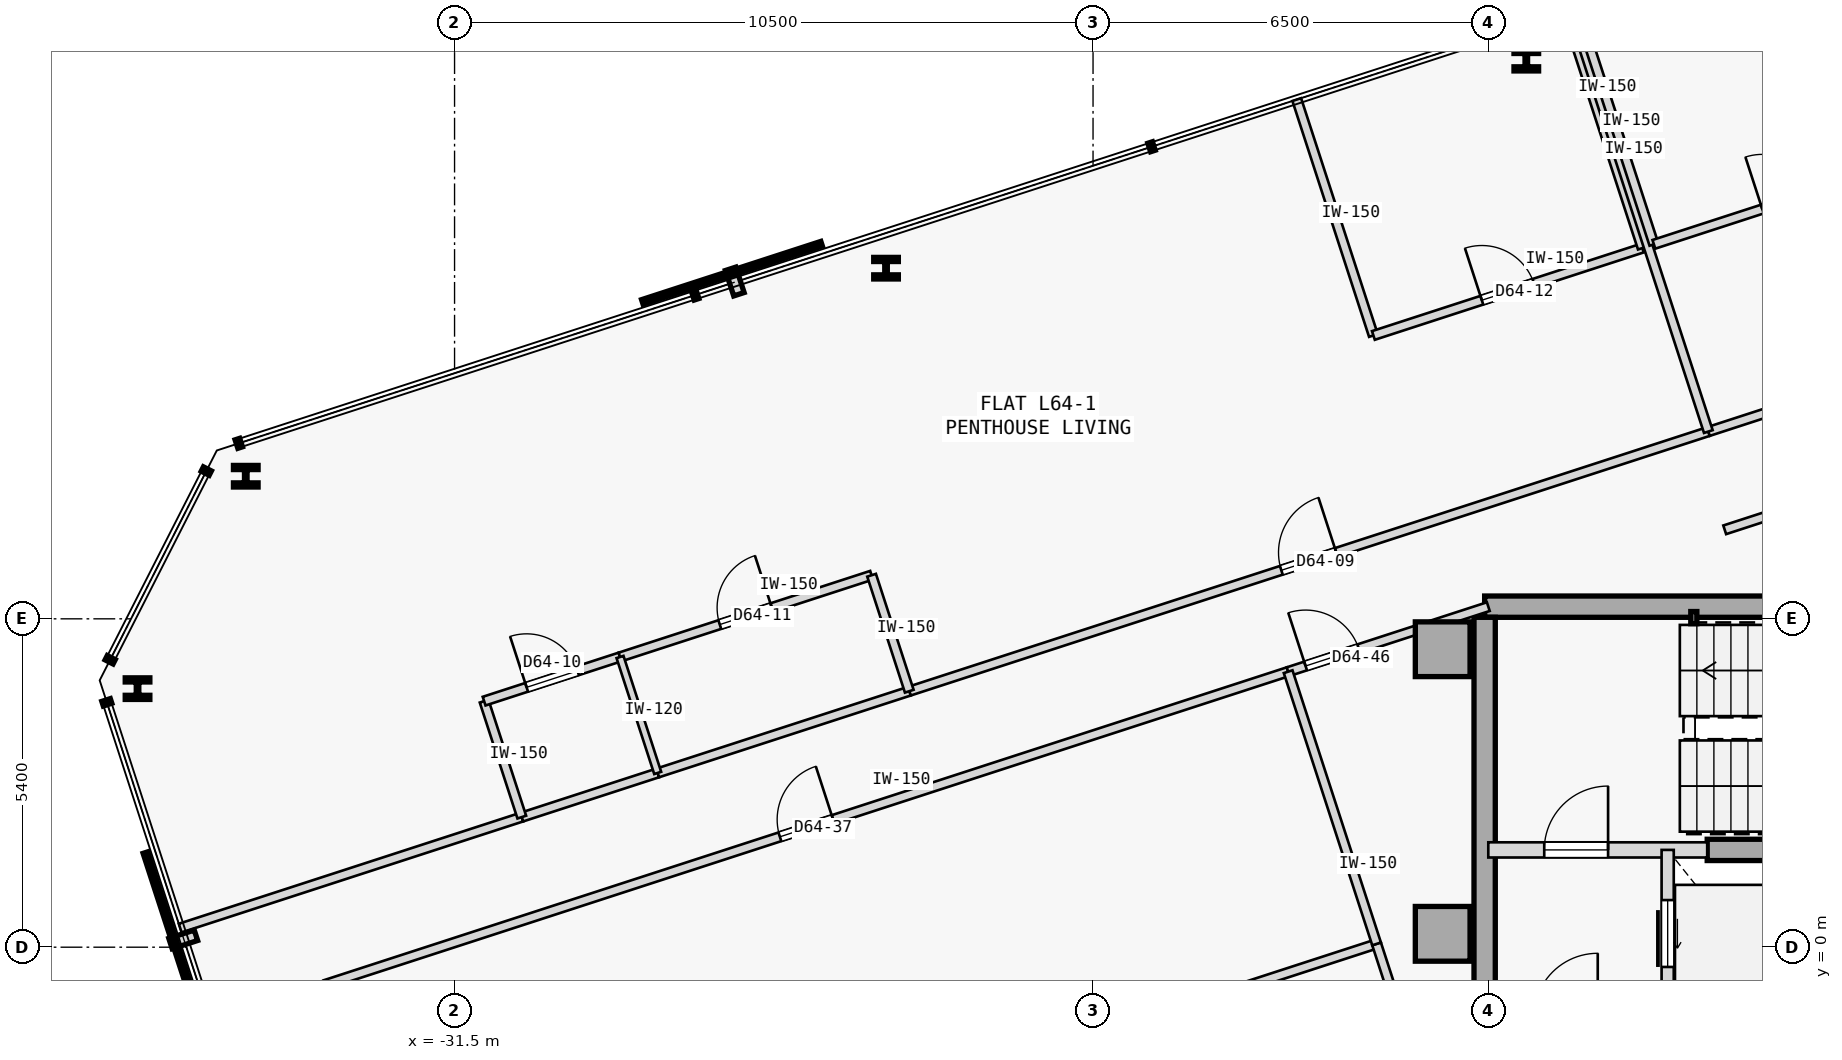
"""IFC4 building model, lengths in metres.
Left out: names, types, materials, properties, quantities, classifications, styles, units other than length and angle.
Written with IfcOpenShell. Run it as: python <this file> out.ifc"""

import sys

from ifc_helpers import new_model, si_unit, direction, frame, frame_2d, origin, origin_2d, place, context, subcontext, project, spatial, rectangle, hollow_rectangle, i_section, extrude, element, fill, save


model = new_model("IFC4")
c1 = context("Model", 3, precision=1e-05, world=origin(), true_north=direction((0.0, 1.0)))
c2 = subcontext(c1, "Body", "Model", "MODEL_VIEW")
j1 = project(units=[si_unit("LENGTHUNIT", "METRE"), si_unit("PLANEANGLEUNIT", "RADIAN")], contexts=[c1])
p1 = place(None, origin())
s1 = spatial("IfcSite", under=j1, at=p1, CompositionType="ELEMENT")
p2 = place(p1, origin())
s2 = spatial("IfcBuilding", under=s1, at=p2, CompositionType="ELEMENT")
p3 = place(p2, frame((0.0, 0.0, 241.05)))
s3 = spatial("IfcBuildingStorey", under=s2, at=p3, CompositionType="ELEMENT", Elevation=241.05)
for number, where, z_axis, x_axis in (
    (1, (-15.25, 4.9, 0.0), (0.0, 0.0, 1.0), (1.0, 0.0, 0.0)),
    (2, (-15.25, 0.22, 0.0), (0.0, 0.0, 1.0), (1.0, 0.0, 0.0)),
):
    element("IfcColumn", number, at=place(p3, frame(where, z_axis=z_axis, x_axis=x_axis)), inside=s3, PredefinedType="COLUMN", context=c2, shape_type="SweptSolid", body=[
        extrude(rectangle(XDim=0.9, YDim=0.9, at=origin_2d()), origin(), (0.0, 0.0, 1.0), 3.35),
    ])
p4 = place(p3, frame((-14.56, 5.6, 0.0), z_axis=(0.0, 0.0, 1.0), x_axis=(1.0, 0.0, 0.0)))
e3 = element("IfcWall", 3, at=p4, inside=s3, PredefinedType="SHEAR", context=c2, shape_type="SweptSolid", body=[
    extrude(rectangle(XDim=11.41, YDim=0.35, at=frame_2d((5.705, 0.0))), origin(), (0.0, 0.0, 1.0), 3.125),
])
p5 = place(p3, frame((-14.56, -5.425, 0.0), z_axis=(0.0, 0.0, 1.0), x_axis=(0.0, 1.0, 0.0)))
e4 = element("IfcWall", 4, at=p5, inside=s3, PredefinedType="SHEAR", context=c2, shape_type="SweptSolid", body=[
    extrude(rectangle(XDim=10.85, YDim=0.35, at=frame_2d((5.425, 0.0))), origin(), (0.0, 0.0, 1.0), 3.125),
])
p6 = place(p3, frame((-10.9, 1.6, 0.0), z_axis=(0.0, 0.0, 1.0), x_axis=(1.0, 0.0, 0.0)))
e5 = element("IfcWall", 5, at=p6, inside=s3, PredefinedType="SHEAR", context=c2, shape_type="SweptSolid", body=[
    extrude(rectangle(XDim=5.15, YDim=0.35, at=frame_2d((2.575, 0.0))), origin(), (0.0, 0.0, 1.0), 3.125),
])
p7 = place(p3, frame((-11.12, 5.42, 0.0), z_axis=(0.0, 0.0, 1.0), x_axis=(1.0, 0.0, 0.0)))
e6 = element("IfcColumn", 6, at=p7, inside=s3, PredefinedType="COLUMN", context=c2, shape_type="SweptSolid", body=[
    extrude(hollow_rectangle(XDim=0.1, YDim=0.2, WallThickness=0.008, at=origin_2d()), origin(), (0.0, 0.0, 1.0), 3.35),
])
for number, where, z_axis, x_axis in (
    (7, (-13.875, 14.587, 0.0), (0.0, 0.0, 1.0), (1.0, 0.0, 0.0)),
    (8, (-24.404, 11.166, 0.0), (0.0, 0.0, 1.0), (1.0, 0.0, 0.0)),
    (9, (-34.934, 7.745, 0.0), (0.0, 0.0, 1.0), (1.0, 0.0, 0.0)),
    (10, (-36.713, 4.252, 0.0), (0.0, 0.0, 1.0), (1.0, 0.0, 0.0)),
):
    element("IfcColumn", number, at=place(p3, frame(where, z_axis=z_axis, x_axis=x_axis)), inside=s3, PredefinedType="COLUMN", context=c2, shape_type="SweptSolid", body=[
        extrude(i_section(OverallWidth=0.405, OverallDepth=0.355, WebThickness=0.042, FlangeThickness=0.068, FilletRadius=0.015, at=origin_2d()), origin(), (0.0, 0.0, 1.0), 3.35),
    ])
p8 = place(p3, frame((-14.5, 1.6, 0.0), z_axis=(0.0, 0.0, 1.0), x_axis=(1.0, 0.0, 0.0)))
e11 = element("IfcWall", 11, at=p8, inside=s3, PredefinedType="STANDARD", context=c2, shape_type="SweptSolid", body=[
    extrude(rectangle(XDim=3.6, YDim=0.25, at=frame_2d((1.8, 0.0))), origin(), (0.0, 0.0, 1.0), 3.125),
])
p9 = place(p8, frame((0.92, 0.0, 0.0)))
e12 = element("IfcOpeningElement", 12, at=p9, cuts=e11, PredefinedType="OPENING", context=c2, shape_type="SweptSolid", body=[
    extrude(rectangle(XDim=1.05, YDim=2.15, at=frame_2d((0.525, 1.075))), frame((0.0, 0.135, 0.0), z_axis=(0.0, -1.0, 0.0), x_axis=(1.0, 0.0, 0.0)), (0.0, 0.0, 1.0), 0.27),
])
p10 = place(p3, frame((-11.55, -1.15, 0.0), z_axis=(0.0, 0.0, 1.0), x_axis=(0.0, 1.0, 0.0)))
e13 = element("IfcWall", 13, at=p10, inside=s3, PredefinedType="STANDARD", context=c2, shape_type="SweptSolid", body=[
    extrude(rectangle(XDim=2.75, YDim=0.2, at=frame_2d((1.375, 0.0))), origin(), (0.0, 0.0, 1.0), 3.125),
])
p11 = place(p10, frame((0.825, 0.0, 0.0)))
e14 = element("IfcOpeningElement", 14, at=p11, cuts=e13, PredefinedType="OPENING", context=c2, shape_type="SweptSolid", body=[
    extrude(rectangle(XDim=1.1, YDim=2.15, at=frame_2d((0.55, 1.075))), frame((0.0, 0.11, 0.0), z_axis=(0.0, -1.0, 0.0), x_axis=(1.0, 0.0, 0.0)), (0.0, 0.0, 1.0), 0.22),
])
p12 = place(p3, frame((-36.012, 0.314, 0.0), z_axis=(0.0, 0.0, 1.0), x_axis=(0.951065348244, 0.308989811111, 0.0)))
e15 = element("IfcWall", 15, at=p12, inside=s3, PredefinedType="PARTITIONING", context=c2, shape_type="SweptSolid", body=[
    extrude(rectangle(XDim=5.907, YDim=0.15, at=frame_2d((2.954, 0.0))), origin(), (0.0, 0.0, 1.0), 3.125),
])
p13 = place(p3, frame((-24.022, 4.21, 0.0), z_axis=(0.0, 0.0, 1.0), x_axis=(0.951058997127, 0.309009359055, 0.0)))
e16 = element("IfcWall", 16, at=p13, inside=s3, PredefinedType="PARTITIONING", context=c2, shape_type="SweptSolid", body=[
    extrude(rectangle(XDim=13.817, YDim=0.15, at=frame_2d((6.908, 0.0))), origin(), (0.0, 0.0, 1.0), 3.125),
])
p14 = place(p13, frame((6.434, 0.0, 0.0)))
e17 = element("IfcOpeningElement", 17, at=p14, cuts=e16, PredefinedType="OPENING", context=c2, shape_type="SweptSolid", body=[
    extrude(rectangle(XDim=0.95, YDim=2.15, at=frame_2d((0.475, 1.075))), frame((0.0, 0.085, 0.0), z_axis=(0.0, -1.0, 0.0), x_axis=(1.0, 0.0, 0.0)), (0.0, 0.0, 1.0), 0.17),
])
p15 = place(p3, frame((-30.394, 2.139, 0.0), z_axis=(0.0, 0.0, 1.0), x_axis=(0.951045519245, 0.309050837767, 0.0)))
e18 = element("IfcWall", 18, at=p15, inside=s3, PredefinedType="PARTITIONING", context=c2, shape_type="SweptSolid", body=[
    extrude(rectangle(XDim=2.35, YDim=0.15, at=frame_2d((1.175, 0.0))), origin(), (0.0, 0.0, 1.0), 3.125),
])
p16 = place(p3, frame((-28.159, 2.866, 0.0), z_axis=(0.0, 0.0, 1.0), x_axis=(0.951052627573, 0.309028962374, 0.0)))
e19 = element("IfcWall", 19, at=p16, inside=s3, PredefinedType="PARTITIONING", context=c2, shape_type="SweptSolid", body=[
    extrude(rectangle(XDim=4.35, YDim=0.15, at=frame_2d((2.175, 0.0))), origin(), (0.0, 0.0, 1.0), 3.125),
])
p17 = place(p3, frame((-10.882, 8.479, 0.0), z_axis=(0.0, 0.0, 1.0), x_axis=(0.951051887333, 0.309031240494, 0.0)))
e20 = element("IfcWall", 20, at=p17, inside=s3, PredefinedType="PARTITIONING", context=c2, shape_type="SweptSolid", body=[
    extrude(rectangle(XDim=7.551, YDim=0.15, at=frame_2d((3.775, 0.0))), origin(), (0.0, 0.0, 1.0), 3.125),
])
p18 = place(p3, frame((-33.633, -0.616, 0.0), z_axis=(0.0, 0.0, 1.0), x_axis=(0.951058192995, 0.309011833974, 0.0)))
e21 = element("IfcWall", 21, at=p18, inside=s3, PredefinedType="PARTITIONING", context=c2, shape_type="SweptSolid", body=[
    extrude(rectangle(XDim=16.657, YDim=0.15, at=frame_2d((8.329, 0.0))), origin(), (0.0, 0.0, 1.0), 3.125),
])
p19 = place(p18, frame((7.868, 0.0, 0.0)))
e22 = element("IfcOpeningElement", 22, at=p19, cuts=e21, PredefinedType="OPENING", context=c2, shape_type="SweptSolid", body=[
    extrude(rectangle(XDim=0.92, YDim=2.15, at=frame_2d((0.46, 1.075))), frame((0.0, 0.085, 0.0), z_axis=(0.0, -1.0, 0.0), x_axis=(1.0, 0.0, 0.0)), (0.0, 0.0, 1.0), 0.17),
])
p20 = place(p3, frame((-17.792, 4.531, 0.0), z_axis=(0.0, 0.0, 1.0), x_axis=(0.951047546178, 0.309044600193, 0.0)))
e23 = element("IfcWall", 23, at=p20, inside=s3, PredefinedType="PARTITIONING", context=c2, shape_type="SweptSolid", body=[
    extrude(rectangle(XDim=3.461, YDim=0.15, at=frame_2d((1.73, 0.0))), origin(), (0.0, 0.0, 1.0), 3.125),
])
p21 = place(p20, frame((0.302, 0.0, 0.0)))
e24 = element("IfcOpeningElement", 24, at=p21, cuts=e23, PredefinedType="OPENING", context=c2, shape_type="SweptSolid", body=[
    extrude(rectangle(XDim=0.92, YDim=2.15, at=frame_2d((0.46, 1.075))), frame((0.0, 0.085, 0.0), z_axis=(0.0, -1.0, 0.0), x_axis=(1.0, 0.0, 0.0)), (0.0, 0.0, 1.0), 0.17),
])
p22 = place(p3, frame((-10.612, 6.864, 0.0), z_axis=(0.0, 0.0, 1.0), x_axis=(0.951060972078, 0.309003280548, 0.0)))
e25 = element("IfcWall", 25, at=p22, inside=s3, PredefinedType="PARTITIONING", context=c2, shape_type="SweptSolid", body=[
    extrude(rectangle(XDim=7.268, YDim=0.15, at=frame_2d((3.634, 0.0))), origin(), (0.0, 0.0, 1.0), 3.125),
])
p23 = place(p22, frame((3.174, 0.0, 0.0)))
e26 = element("IfcOpeningElement", 26, at=p23, cuts=e25, PredefinedType="OPENING", context=c2, shape_type="SweptSolid", body=[
    extrude(rectangle(XDim=0.92, YDim=2.15, at=frame_2d((0.46, 1.075))), frame((0.0, 0.085, 0.0), z_axis=(0.0, -1.0, 0.0), x_axis=(1.0, 0.0, 0.0)), (0.0, 0.0, 1.0), 0.17),
])
p24 = place(p3, frame((-30.394, 2.139, 0.0), z_axis=(0.0, 0.0, 1.0), x_axis=(-0.309022749039, 0.951054646472, 0.0)))
e27 = element("IfcWall", 27, at=p24, inside=s3, PredefinedType="PARTITIONING", context=c2, shape_type="SweptSolid", body=[
    extrude(rectangle(XDim=2.005, YDim=0.15, at=frame_2d((1.002, 0.0))), origin(), (0.0, 0.0, 1.0), 3.125),
])
p25 = place(p3, frame((-31.014, 4.046, 0.0), z_axis=(0.0, 0.0, 1.0), x_axis=(0.951076048914, 0.308956872689, 0.0)))
e28 = element("IfcWall", 28, at=p25, inside=s3, PredefinedType="PARTITIONING", context=c2, shape_type="SweptSolid", body=[
    extrude(rectangle(XDim=2.35, YDim=0.15, at=frame_2d((1.175, 0.0))), origin(), (0.0, 0.0, 1.0), 3.125),
])
p26 = place(p25, frame((0.735, 0.0, 0.0)))
e29 = element("IfcOpeningElement", 29, at=p26, cuts=e28, PredefinedType="OPENING", context=c2, shape_type="SweptSolid", body=[
    extrude(rectangle(XDim=0.88, YDim=2.15, at=frame_2d((0.44, 1.075))), frame((0.0, 0.085, 0.0), z_axis=(0.0, -1.0, 0.0), x_axis=(1.0, 0.0, 0.0)), (0.0, 0.0, 1.0), 0.17),
])
p27 = place(p3, frame((-28.779, 4.772, 0.0), z_axis=(0.0, 0.0, 1.0), x_axis=(0.951052627573, 0.309028962374, 0.0)))
e30 = element("IfcWall", 30, at=p27, inside=s3, PredefinedType="PARTITIONING", context=c2, shape_type="SweptSolid", body=[
    extrude(rectangle(XDim=4.35, YDim=0.15, at=frame_2d((2.175, 0.0))), origin(), (0.0, 0.0, 1.0), 3.125),
])
p28 = place(p27, frame((1.725, 0.0, 0.0)))
e31 = element("IfcOpeningElement", 31, at=p28, cuts=e30, PredefinedType="OPENING", context=c2, shape_type="SweptSolid", body=[
    extrude(rectangle(XDim=0.9, YDim=2.15, at=frame_2d((0.45, 1.075))), frame((0.0, 0.085, 0.0), z_axis=(0.0, -1.0, 0.0), x_axis=(1.0, 0.0, 0.0)), (0.0, 0.0, 1.0), 0.17),
])
p29 = place(p3, frame((-24.022, 4.21, 0.0), z_axis=(0.0, 0.0, 1.0), x_axis=(-0.309058537449, 0.951043017129, 0.0)))
e32 = element("IfcWall", 32, at=p29, inside=s3, PredefinedType="PARTITIONING", context=c2, shape_type="SweptSolid", body=[
    extrude(rectangle(XDim=2.005, YDim=0.15, at=frame_2d((1.002, 0.0))), origin(), (0.0, 0.0, 1.0), 3.125),
])
p30 = place(p3, frame((-16.389, 10.06, 0.0), z_axis=(0.0, 0.0, 1.0), x_axis=(-0.309018403393, 0.951056058476, 0.0)))
e33 = element("IfcWall", 33, at=p30, inside=s3, PredefinedType="PARTITIONING", context=c2, shape_type="SweptSolid", body=[
    extrude(rectangle(XDim=4.079, YDim=0.15, at=frame_2d((2.04, 0.0))), origin(), (0.0, 0.0, 1.0), 3.125),
])
p31 = place(p3, frame((-16.389, 10.06, 0.0), z_axis=(0.0, 0.0, 1.0), x_axis=(0.951050272606, 0.309036209813, 0.0)))
e34 = element("IfcWall", 34, at=p31, inside=s3, PredefinedType="PARTITIONING", context=c2, shape_type="SweptSolid", body=[
    extrude(rectangle(XDim=4.65, YDim=0.15, at=frame_2d((2.325, 0.0))), origin(), (0.0, 0.0, 1.0), 3.125),
])
p32 = place(p31, frame((1.875, 0.0, 0.0)))
e35 = element("IfcOpeningElement", 35, at=p32, cuts=e34, PredefinedType="OPENING", context=c2, shape_type="SweptSolid", body=[
    extrude(rectangle(XDim=0.9, YDim=2.15, at=frame_2d((0.45, 1.075))), frame((0.0, 0.085, 0.0), z_axis=(0.0, -1.0, 0.0), x_axis=(1.0, 0.0, 0.0)), (0.0, 0.0, 1.0), 0.17),
])
p33 = place(p3, frame((-11.967, 11.497, 0.0), z_axis=(0.0, 0.0, 1.0), x_axis=(-0.309018403393, 0.951056058476, 0.0)))
e36 = element("IfcWall", 36, at=p33, inside=s3, PredefinedType="PARTITIONING", context=c2, shape_type="SweptSolid", body=[
    extrude(rectangle(XDim=4.079, YDim=0.15, at=frame_2d((2.04, 0.0))), origin(), (0.0, 0.0, 1.0), 3.125),
])
p34 = place(p3, frame((-10.882, 8.479, 0.0), z_axis=(0.0, 0.0, 1.0), x_axis=(-0.308998913866, 0.951062390819, 0.0)))
e37 = element("IfcWall", 37, at=p34, inside=s3, PredefinedType="PARTITIONING", context=c2, shape_type="SweptSolid", body=[
    extrude(rectangle(XDim=7.284, YDim=0.15, at=frame_2d((3.642, 0.0))), origin(), (0.0, 0.0, 1.0), 3.125),
])
p35 = place(p3, frame((-28.159, 2.866, 0.0), z_axis=(0.0, 0.0, 1.0), x_axis=(-0.309058537449, 0.951043017129, 0.0)))
e38 = element("IfcWall", 38, at=p35, inside=s3, PredefinedType="PARTITIONING", context=c2, shape_type="SweptSolid", body=[
    extrude(rectangle(XDim=2.005, YDim=0.12, at=frame_2d((1.002, 0.0))), origin(), (0.0, 0.0, 1.0), 3.125),
])
p36 = place(p3, frame((-11.777, 11.559, 0.0), z_axis=(0.0, 0.0, 1.0), x_axis=(-0.309018403393, 0.951056058476, 0.0)))
e39 = element("IfcWall", 39, at=p36, inside=s3, PredefinedType="PARTITIONING", context=c2, shape_type="SweptSolid", body=[
    extrude(rectangle(XDim=4.079, YDim=0.15, at=frame_2d((2.04, 0.0))), origin(), (0.0, 0.0, 1.0), 3.125),
])
p37 = place(p3, frame((-11.777, 11.559, 0.0), z_axis=(0.0, 0.0, 1.0), x_axis=(0.951050272606, 0.309036209813, 0.0)))
e40 = element("IfcWall", 40, at=p37, inside=s3, PredefinedType="PARTITIONING", context=c2, shape_type="SweptSolid", body=[
    extrude(rectangle(XDim=4.65, YDim=0.15, at=frame_2d((2.325, 0.0))), origin(), (0.0, 0.0, 1.0), 3.125),
])
p38 = place(p37, frame((1.875, 0.0, 0.0)))
e41 = element("IfcOpeningElement", 41, at=p38, cuts=e40, PredefinedType="OPENING", context=c2, shape_type="SweptSolid", body=[
    extrude(rectangle(XDim=0.9, YDim=2.15, at=frame_2d((0.45, 1.075))), frame((0.0, 0.085, 0.0), z_axis=(0.0, -1.0, 0.0), x_axis=(1.0, 0.0, 0.0)), (0.0, 0.0, 1.0), 0.17),
])
p39 = place(p3, frame((-32.179, -5.093, 0.0), z_axis=(0.0, 0.0, 1.0), x_axis=(0.951053885426, 0.309025091239, 0.0)))
e42 = element("IfcWall", 42, at=p39, inside=s3, PredefinedType="PARTITIONING", context=c2, shape_type="SweptSolid", body=[
    extrude(rectangle(XDim=16.657, YDim=0.15, at=frame_2d((8.329, 0.0))), origin(), (0.0, 0.0, 1.0), 3.125),
])
p40 = place(p3, frame((-15.685, -1.952, 0.0), z_axis=(0.0, 0.0, 1.0), x_axis=(-0.308929092959, 0.951085072706, 0.0)))
e43 = element("IfcWall", 43, at=p40, inside=s3, PredefinedType="PARTITIONING", context=c2, shape_type="SweptSolid", body=[
    extrude(rectangle(XDim=2.11, YDim=0.15, at=frame_2d((1.055, 0.0))), origin(), (0.0, 0.0, 1.0), 3.125),
])
p41 = place(p3, frame((-16.337, 0.054, 0.0), z_axis=(0.0, 0.0, 1.0), x_axis=(-0.309029776355, 0.951052363083, 0.0)))
e44 = element("IfcWall", 44, at=p41, inside=s3, PredefinedType="PARTITIONING", context=c2, shape_type="SweptSolid", body=[
    extrude(rectangle(XDim=4.707, YDim=0.15, at=frame_2d((2.354, 0.0))), origin(), (0.0, 0.0, 1.0), 3.125),
])
p42 = place(p9, origin())
e45 = element("IfcDoor", 45, at=p42, inside=s3, OperationType="SINGLE_SWING_RIGHT", PredefinedType="DOOR", context=c2, shape_type="SweptSolid", body=[
    extrude(rectangle(XDim=1.05, YDim=2.15, at=frame_2d((0.525, 1.075))), frame((0.0, 0.025, 0.0), z_axis=(0.0, -1.0, 0.0), x_axis=(1.0, 0.0, 0.0)), (0.0, 0.0, 1.0), 0.05),
])
fill(e12, e45)
p43 = place(p11, origin())
e46 = element("IfcDoor", 46, at=p43, inside=s3, OperationType="SLIDING_TO_RIGHT", PredefinedType="DOOR", context=c2, shape_type="SweptSolid", body=[
    extrude(rectangle(XDim=1.1, YDim=2.15, at=frame_2d((0.55, 1.075))), frame((0.0, 0.025, 0.0), z_axis=(0.0, -1.0, 0.0), x_axis=(1.0, 0.0, 0.0)), (0.0, 0.0, 1.0), 0.05),
])
fill(e14, e46)
p44 = place(p14, origin())
e47 = element("IfcDoor", 47, at=p44, inside=s3, OperationType="SINGLE_SWING_RIGHT", PredefinedType="DOOR", context=c2, shape_type="SweptSolid", body=[
    extrude(rectangle(XDim=0.95, YDim=2.15, at=frame_2d((0.475, 1.075))), frame((0.0, 0.025, 0.0), z_axis=(0.0, -1.0, 0.0), x_axis=(1.0, 0.0, 0.0)), (0.0, 0.0, 1.0), 0.05),
])
fill(e17, e47)
p45 = place(p26, origin())
e48 = element("IfcDoor", 48, at=p45, inside=s3, OperationType="SINGLE_SWING_LEFT", PredefinedType="DOOR", context=c2, shape_type="SweptSolid", body=[
    extrude(rectangle(XDim=0.88, YDim=2.15, at=frame_2d((0.44, 1.075))), frame((0.0, 0.025, 0.0), z_axis=(0.0, -1.0, 0.0), x_axis=(1.0, 0.0, 0.0)), (0.0, 0.0, 1.0), 0.05),
])
fill(e29, e48)
p46 = place(p28, origin())
e49 = element("IfcDoor", 49, at=p46, inside=s3, OperationType="SINGLE_SWING_RIGHT", PredefinedType="DOOR", context=c2, shape_type="SweptSolid", body=[
    extrude(rectangle(XDim=0.9, YDim=2.15, at=frame_2d((0.45, 1.075))), frame((0.0, 0.025, 0.0), z_axis=(0.0, -1.0, 0.0), x_axis=(1.0, 0.0, 0.0)), (0.0, 0.0, 1.0), 0.05),
])
fill(e31, e49)
p47 = place(p32, origin())
e50 = element("IfcDoor", 50, at=p47, inside=s3, OperationType="SINGLE_SWING_LEFT", PredefinedType="DOOR", context=c2, shape_type="SweptSolid", body=[
    extrude(rectangle(XDim=0.9, YDim=2.15, at=frame_2d((0.45, 1.075))), frame((0.0, 0.025, 0.0), z_axis=(0.0, -1.0, 0.0), x_axis=(1.0, 0.0, 0.0)), (0.0, 0.0, 1.0), 0.05),
])
fill(e35, e50)
p48 = place(p38, origin())
e51 = element("IfcDoor", 51, at=p48, inside=s3, OperationType="SINGLE_SWING_LEFT", PredefinedType="DOOR", context=c2, shape_type="SweptSolid", body=[
    extrude(rectangle(XDim=0.9, YDim=2.15, at=frame_2d((0.45, 1.075))), frame((0.0, 0.025, 0.0), z_axis=(0.0, -1.0, 0.0), x_axis=(1.0, 0.0, 0.0)), (0.0, 0.0, 1.0), 0.05),
])
fill(e41, e51)
p49 = place(p19, origin())
e52 = element("IfcDoor", 52, at=p49, inside=s3, OperationType="SINGLE_SWING_RIGHT", PredefinedType="DOOR", context=c2, shape_type="SweptSolid", body=[
    extrude(rectangle(XDim=0.92, YDim=2.15, at=frame_2d((0.46, 1.075))), frame((0.0, 0.025, 0.0), z_axis=(0.0, -1.0, 0.0), x_axis=(1.0, 0.0, 0.0)), (0.0, 0.0, 1.0), 0.05),
])
fill(e22, e52)
p50 = place(p21, origin())
e53 = element("IfcDoor", 53, at=p50, inside=s3, OperationType="SINGLE_SWING_LEFT", PredefinedType="DOOR", context=c2, shape_type="SweptSolid", body=[
    extrude(rectangle(XDim=0.92, YDim=2.15, at=frame_2d((0.46, 1.075))), frame((0.0, 0.025, 0.0), z_axis=(0.0, -1.0, 0.0), x_axis=(1.0, 0.0, 0.0)), (0.0, 0.0, 1.0), 0.05),
])
fill(e24, e53)
save(model, sys.argv[1])
